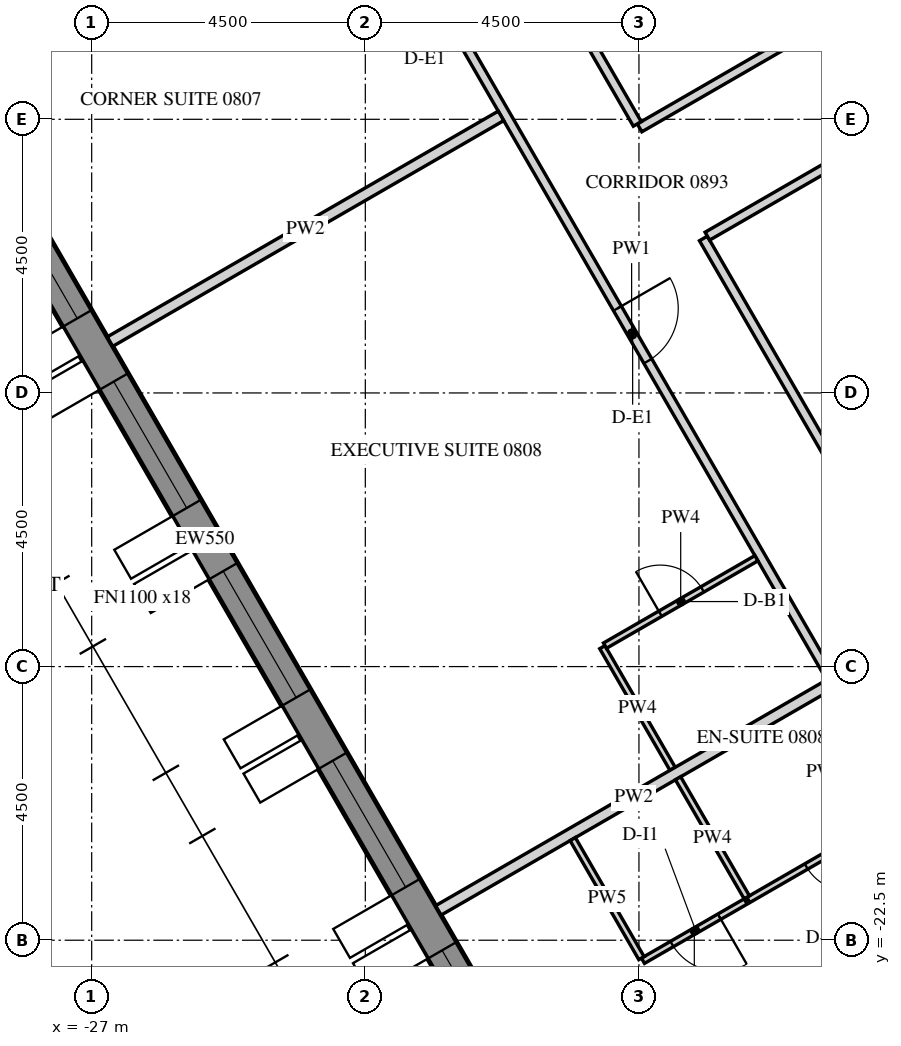
"""IFC4 building model, lengths in metres.
Left out: names, types, materials, properties, quantities, classifications, styles, units other than length and angle.
Written with IfcOpenShell. Run it as: python <this file> out.ifc"""

import sys

from ifc_helpers import new_model, si_unit, direction, frame, frame_2d, origin, place, context, subcontext, project, spatial, polyline, rectangle, outline, extrude, element, fill, save


model = new_model("IFC4")
c1 = context("Model", 3, precision=1e-05, world=origin(), true_north=direction((0.0, 1.0)))
c2 = subcontext(c1, "Body", "Model", "MODEL_VIEW")
j1 = project(units=[si_unit("LENGTHUNIT", "METRE"), si_unit("PLANEANGLEUNIT", "RADIAN")], contexts=[c1])
p1 = place(None, origin())
s1 = spatial("IfcSite", under=j1, at=p1, CompositionType="ELEMENT")
p2 = place(p1, origin())
s2 = spatial("IfcBuilding", under=s1, at=p2, CompositionType="ELEMENT")
p3 = place(p2, frame((0.0, 0.0, 111.6)))
s3 = spatial("IfcBuildingStorey", under=s2, at=p3, CompositionType="ELEMENT", Elevation=111.6)
p4 = place(p3, frame((-32.655, -2.89, -0.15), z_axis=(0.0, 0.0, 1.0), x_axis=(0.499997711317, -0.866026725152, 0.0)))
e1 = element("IfcWall", 1, at=p4, inside=s3, PredefinedType="SOLIDWALL", context=c2, shape_type="SweptSolid", body=[
    extrude(outline(polyline([(-0.022, -0.275), (30.097, -0.275), (30.045, 0.275), (0.022, 0.275), (-0.022, -0.275)])), origin(), (0.0, 0.0, 1.0), 3.9),
])
p5 = place(p4, frame((1.236, 0.0, 1.05)))
e2 = element("IfcOpeningElement", 2, at=p5, cuts=e1, PredefinedType="OPENING", context=c2, shape_type="SweptSolid", body=[
    extrude(rectangle(XDim=2.4, YDim=2.4, at=frame_2d((1.2, 1.2))), frame((0.0, 0.285, 0.0), z_axis=(0.0, -1.0, 0.0), x_axis=(1.0, 0.0, 0.0)), (0.0, 0.0, 1.0), 0.57),
])
p6 = place(p4, frame((4.835, 0.0, 1.05)))
e3 = element("IfcOpeningElement", 3, at=p6, cuts=e1, PredefinedType="OPENING", context=c2, shape_type="SweptSolid", body=[
    extrude(rectangle(XDim=2.4, YDim=2.4, at=frame_2d((1.2, 1.2))), frame((0.0, 0.285, 0.0), z_axis=(0.0, -1.0, 0.0), x_axis=(1.0, 0.0, 0.0)), (0.0, 0.0, 1.0), 0.57),
])
p7 = place(p4, frame((8.436, 0.0, 1.05)))
e4 = element("IfcOpeningElement", 4, at=p7, cuts=e1, PredefinedType="OPENING", context=c2, shape_type="SweptSolid", body=[
    extrude(rectangle(XDim=2.4, YDim=2.4, at=frame_2d((1.2, 1.2))), frame((0.0, 0.285, 0.0), z_axis=(0.0, -1.0, 0.0), x_axis=(1.0, 0.0, 0.0)), (0.0, 0.0, 1.0), 0.57),
])
p8 = place(p4, frame((12.035, 0.0, 1.05)))
e5 = element("IfcOpeningElement", 5, at=p8, cuts=e1, PredefinedType="OPENING", context=c2, shape_type="SweptSolid", body=[
    extrude(rectangle(XDim=2.4, YDim=2.4, at=frame_2d((1.2, 1.2))), frame((0.0, 0.285, 0.0), z_axis=(0.0, -1.0, 0.0), x_axis=(1.0, 0.0, 0.0)), (0.0, 0.0, 1.0), 0.57),
])
p9 = place(p4, frame((15.635, 0.0, 1.05)))
e6 = element("IfcOpeningElement", 6, at=p9, cuts=e1, PredefinedType="OPENING", context=c2, shape_type="SweptSolid", body=[
    extrude(rectangle(XDim=2.4, YDim=2.4, at=frame_2d((1.2, 1.2))), frame((0.0, 0.285, 0.0), z_axis=(0.0, -1.0, 0.0), x_axis=(1.0, 0.0, 0.0)), (0.0, 0.0, 1.0), 0.57),
])
p10 = place(p4, frame((19.236, 0.0, 1.05)))
e7 = element("IfcOpeningElement", 7, at=p10, cuts=e1, PredefinedType="OPENING", context=c2, shape_type="SweptSolid", body=[
    extrude(rectangle(XDim=2.4, YDim=2.4, at=frame_2d((1.2, 1.2))), frame((0.0, 0.285, 0.0), z_axis=(0.0, -1.0, 0.0), x_axis=(1.0, 0.0, 0.0)), (0.0, 0.0, 1.0), 0.57),
])
p11 = place(p4, frame((22.835, 0.0, 1.05)))
e8 = element("IfcOpeningElement", 8, at=p11, cuts=e1, PredefinedType="OPENING", context=c2, shape_type="SweptSolid", body=[
    extrude(rectangle(XDim=2.4, YDim=2.4, at=frame_2d((1.2, 1.2))), frame((0.0, 0.285, 0.0), z_axis=(0.0, -1.0, 0.0), x_axis=(1.0, 0.0, 0.0)), (0.0, 0.0, 1.0), 0.57),
])
p12 = place(p4, frame((26.436, 0.0, 1.05)))
e9 = element("IfcOpeningElement", 9, at=p12, cuts=e1, PredefinedType="OPENING", context=c2, shape_type="SweptSolid", body=[
    extrude(rectangle(XDim=2.4, YDim=2.4, at=frame_2d((1.2, 1.2))), frame((0.0, 0.285, 0.0), z_axis=(0.0, -1.0, 0.0), x_axis=(1.0, 0.0, 0.0)), (0.0, 0.0, 1.0), 0.57),
])
p13 = place(p3, frame((-15.819, 0.0, -0.15), z_axis=(0.0, 0.0, 1.0), x_axis=(0.499999880136, -0.866025472988, 0.0)))
e10 = element("IfcWall", 10, at=p13, inside=s3, PredefinedType="SHEAR", context=c2, shape_type="SweptSolid", body=[
    extrude(outline(polyline([(-0.173, -0.3), (15.993, -0.3), (15.646, 0.3), (0.173, 0.3), (-0.173, -0.3)])), origin(), (0.0, 0.0, 1.0), 3.9),
])
p14 = place(p13, frame((6.981, 0.0, 0.15)))
e11 = element("IfcOpeningElement", 11, at=p14, cuts=e10, PredefinedType="OPENING", context=c2, shape_type="SweptSolid", body=[
    extrude(rectangle(XDim=1.8, YDim=2.4, at=frame_2d((0.9, 1.2))), frame((0.0, 0.31, 0.0), z_axis=(0.0, -1.0, 0.0), x_axis=(1.0, 0.0, 0.0)), (0.0, 0.0, 1.0), 0.62),
])
p15 = place(p3, frame((-24.09, -2.175, 0.0), z_axis=(0.0, 0.0, 1.0), x_axis=(0.499996832073, -0.86602723278, 0.0)))
e12 = element("IfcWall", 12, at=p15, inside=s3, PredefinedType="PARTITIONING", context=c2, shape_type="SweptSolid", body=[
    extrude(rectangle(XDim=23.877, YDim=0.15, at=frame_2d((11.938, 0.0))), origin(), (0.0, 0.0, 1.0), 2.988),
])
p16 = place(p15, frame((4.643, 0.0, 0.0)))
e13 = element("IfcOpeningElement", 13, at=p16, cuts=e12, PredefinedType="OPENING", context=c2, shape_type="SweptSolid", body=[
    extrude(rectangle(XDim=1.0, YDim=2.1, at=frame_2d((0.5, 1.05))), frame((0.0, 0.085, 0.0), z_axis=(0.0, -1.0, 0.0), x_axis=(1.0, 0.0, 0.0)), (0.0, 0.0, 1.0), 0.17),
])
p17 = place(p15, frame((11.472, 0.0, 0.0)))
e14 = element("IfcOpeningElement", 14, at=p17, cuts=e12, PredefinedType="OPENING", context=c2, shape_type="SweptSolid", body=[
    extrude(rectangle(XDim=1.0, YDim=2.1, at=frame_2d((0.5, 1.05))), frame((0.0, 0.085, 0.0), z_axis=(0.0, -1.0, 0.0), x_axis=(1.0, 0.0, 0.0)), (0.0, 0.0, 1.0), 0.17),
])
p18 = place(p15, frame((21.925, 0.0, 0.0)))
e15 = element("IfcOpeningElement", 15, at=p18, cuts=e12, PredefinedType="OPENING", context=c2, shape_type="SweptSolid", body=[
    extrude(rectangle(XDim=1.0, YDim=2.1, at=frame_2d((0.5, 1.05))), frame((0.0, 0.085, 0.0), z_axis=(0.0, -1.0, 0.0), x_axis=(1.0, 0.0, 0.0)), (0.0, 0.0, 1.0), 0.17),
])
p19 = place(p3, frame((-12.664, -6.066, 0.0), z_axis=(0.0, 0.0, 1.0), x_axis=(-0.866023618125, -0.500003092839, 0.0)))
e16 = element("IfcWall", 16, at=p19, inside=s3, PredefinedType="PARTITIONING", context=c2, shape_type="SweptSolid", body=[
    extrude(rectangle(XDim=6.15, YDim=0.15, at=frame_2d((3.075, 0.0))), origin(), (0.0, 0.0, 1.0), 2.988),
])
p20 = place(p3, frame((-18.027, -9.076, 0.0), z_axis=(0.0, 0.0, 1.0), x_axis=(-0.500007318041, 0.86602117867, 0.0)))
e17 = element("IfcWall", 17, at=p20, inside=s3, PredefinedType="PARTITIONING", context=c2, shape_type="SweptSolid", body=[
    extrude(rectangle(XDim=8.383, YDim=0.15, at=frame_2d((4.191, 0.0))), origin(), (0.0, 0.0, 1.0), 2.988),
])
p21 = place(p20, frame((3.742, 0.0, 0.0)))
e18 = element("IfcOpeningElement", 18, at=p21, cuts=e17, PredefinedType="OPENING", context=c2, shape_type="SweptSolid", body=[
    extrude(rectangle(XDim=0.9, YDim=2.1, at=frame_2d((0.45, 1.05))), frame((0.0, 0.085, 0.0), z_axis=(0.0, -1.0, 0.0), x_axis=(1.0, 0.0, 0.0)), (0.0, 0.0, 1.0), 0.17),
])
p22 = place(p3, frame((-11.197, -20.907, 0.0), z_axis=(0.0, 0.0, 1.0), x_axis=(-0.500004557924, 0.86602277225, 0.0)))
e19 = element("IfcWall", 19, at=p22, inside=s3, PredefinedType="PARTITIONING", context=c2, shape_type="SweptSolid", body=[
    extrude(rectangle(XDim=11.487, YDim=0.15, at=frame_2d((5.743, 0.0))), origin(), (0.0, 0.0, 1.0), 2.988),
])
p23 = place(p22, frame((5.293, 0.0, 0.0)))
e20 = element("IfcOpeningElement", 20, at=p23, cuts=e19, PredefinedType="OPENING", context=c2, shape_type="SweptSolid", body=[
    extrude(rectangle(XDim=0.9, YDim=2.1, at=frame_2d((0.45, 1.05))), frame((0.0, 0.085, 0.0), z_axis=(0.0, -1.0, 0.0), x_axis=(1.0, 0.0, 0.0)), (0.0, 0.0, 1.0), 0.17),
])
p24 = place(p3, frame((-16.875, -10.922, 0.0), z_axis=(0.0, 0.0, 1.0), x_axis=(0.866023634079, 0.500003065207, 0.0)))
e21 = element("IfcWall", 21, at=p24, inside=s3, PredefinedType="PARTITIONING", context=c2, shape_type="SweptSolid", body=[
    extrude(rectangle(XDim=6.075, YDim=0.15, at=frame_2d((3.038, 0.0))), origin(), (0.0, 0.0, 1.0), 2.988),
])
p25 = place(p3, frame((-26.699, -12.656, 0.0), z_axis=(0.0, 0.0, 1.0), x_axis=(0.866028983062, 0.499993800457, 0.0)))
e22 = element("IfcWall", 22, at=p25, inside=s3, PredefinedType="PARTITIONING", context=c2, shape_type="SweptSolid", body=[
    extrude(rectangle(XDim=7.425, YDim=0.18, at=frame_2d((3.712, 0.0))), origin(), (0.0, 0.0, 1.0), 2.988),
])
p26 = place(p3, frame((-17.447, -19.681, 0.0), z_axis=(0.0, 0.0, 1.0), x_axis=(-0.500015210774, 0.866016621662, 0.0)))
e23 = element("IfcWall", 23, at=p26, inside=s3, PredefinedType="PARTITIONING", context=c2, shape_type="SweptSolid", body=[
    extrude(rectangle(XDim=2.31, YDim=0.1, at=frame_2d((1.155, 0.0))), origin(), (0.0, 0.0, 1.0), 2.988),
])
p27 = place(p3, frame((-18.559, -17.656, 0.0), z_axis=(0.0, 0.0, 1.0), x_axis=(0.866039941686, 0.499974818771, 0.0)))
e24 = element("IfcWall", 24, at=p27, inside=s3, PredefinedType="PARTITIONING", context=c2, shape_type="SweptSolid", body=[
    extrude(rectangle(XDim=2.875, YDim=0.1, at=frame_2d((1.438, 0.0))), origin(), (0.0, 0.0, 1.0), 2.988),
])
p28 = place(p27, frame((1.05, 0.0, 0.0)))
e25 = element("IfcOpeningElement", 25, at=p28, cuts=e24, PredefinedType="OPENING", context=c2, shape_type="SweptSolid", body=[
    extrude(rectangle(XDim=0.8, YDim=2.1, at=frame_2d((0.4, 1.05))), frame((0.0, 0.06, 0.0), z_axis=(0.0, -1.0, 0.0), x_axis=(1.0, 0.0, 0.0)), (0.0, 0.0, 1.0), 0.12),
])
p29 = place(p3, frame((-21.299, -22.009, 0.0), z_axis=(0.0, 0.0, 1.0), x_axis=(0.866014745021, 0.500018461065, 0.0)))
e26 = element("IfcWall", 26, at=p29, inside=s3, PredefinedType="PARTITIONING", context=c2, shape_type="SweptSolid", body=[
    extrude(rectangle(XDim=7.425, YDim=0.18, at=frame_2d((3.712, 0.0))), origin(), (0.0, 0.0, 1.0), 2.988),
])
p30 = place(p3, frame((-13.669, -20.375, 0.0), z_axis=(0.0, 0.0, 1.0), x_axis=(-0.866046596414, -0.499963291492, 0.0)))
e27 = element("IfcWall", 27, at=p30, inside=s3, PredefinedType="PARTITIONING", context=c2, shape_type="SweptSolid", body=[
    extrude(rectangle(XDim=2.925, YDim=0.1, at=frame_2d((1.462, 0.0))), origin(), (0.0, 0.0, 1.0), 2.988),
])
p31 = place(p30, frame((1.025, 0.0, 0.0)))
e28 = element("IfcOpeningElement", 28, at=p31, cuts=e27, PredefinedType="OPENING", context=c2, shape_type="SweptSolid", body=[
    extrude(rectangle(XDim=0.8, YDim=2.1, at=frame_2d((0.4, 1.05))), frame((0.0, 0.06, 0.0), z_axis=(0.0, -1.0, 0.0), x_axis=(1.0, 0.0, 0.0)), (0.0, 0.0, 1.0), 0.12),
])
p32 = place(p3, frame((-16.245, -21.863, 0.0), z_axis=(0.0, 0.0, 1.0), x_axis=(-0.866000020948, -0.500043961785, 0.0)))
e29 = element("IfcWall", 29, at=p32, inside=s3, PredefinedType="PARTITIONING", context=c2, shape_type="SweptSolid", body=[
    extrude(rectangle(XDim=1.95, YDim=0.1, at=frame_2d((0.975, 0.0))), origin(), (0.0, 0.0, 1.0), 2.988),
])
p33 = place(p32, frame((0.5, 0.0, 0.0)))
e30 = element("IfcOpeningElement", 30, at=p33, cuts=e29, PredefinedType="OPENING", context=c2, shape_type="SweptSolid", body=[
    extrude(rectangle(XDim=0.9, YDim=2.1, at=frame_2d((0.45, 1.05))), frame((0.0, 0.06, 0.0), z_axis=(0.0, -1.0, 0.0), x_axis=(1.0, 0.0, 0.0)), (0.0, 0.0, 1.0), 0.12),
])
p34 = place(p3, frame((-17.959, -22.794, 0.0), z_axis=(0.0, 0.0, 1.0), x_axis=(-0.500031020067, 0.8660074936, 0.0)))
e31 = element("IfcWall", 31, at=p34, inside=s3, PredefinedType="PARTITIONING", context=c2, shape_type="SweptSolid", body=[
    extrude(rectangle(XDim=2.26, YDim=0.1, at=frame_2d((1.13, 0.0))), origin(), (0.0, 0.0, 1.0), 2.988),
])
p35 = place(p3, frame((-15.983, -30.059, 0.0), z_axis=(0.0, 0.0, 1.0), x_axis=(0.469476547643, 0.882944942346, 0.0)))
e32 = element("IfcWall", 32, at=p35, inside=s3, PredefinedType="PARTITIONING", context=c2, shape_type="SweptSolid", body=[
    extrude(rectangle(XDim=8.073, YDim=0.1, at=frame_2d((4.037, 0.0))), origin(), (0.0, 0.0, 1.0), 2.988),
])
p36 = place(p35, frame((3.631, 0.0, 0.0)))
e33 = element("IfcOpeningElement", 33, at=p36, cuts=e32, PredefinedType="OPENING", context=c2, shape_type="SweptSolid", body=[
    extrude(rectangle(XDim=0.9, YDim=2.1, at=frame_2d((0.45, 1.05))), frame((0.0, 0.06, 0.0), z_axis=(0.0, -1.0, 0.0), x_axis=(1.0, 0.0, 0.0)), (0.0, 0.0, 1.0), 0.12),
])
p37 = place(p3, frame((-17.357, -19.837, 0.0), z_axis=(0.0, 0.0, 1.0), x_axis=(0.49995000081, -0.866054268906, 0.0)))
e34 = element("IfcWall", 34, at=p37, inside=s3, PredefinedType="PARTITIONING", context=c2, shape_type="SweptSolid", body=[
    extrude(rectangle(XDim=2.26, YDim=0.1, at=frame_2d((1.13, 0.0))), origin(), (0.0, 0.0, 1.0), 2.988),
])
p38 = place(p7, frame((0.0, 0.205, 0.0)))
e35 = element("IfcWindow", 35, at=p38, inside=s3, PartitioningType="DOUBLE_PANEL_VERTICAL", PredefinedType="WINDOW", context=c2, shape_type="SweptSolid", body=[
    extrude(rectangle(XDim=2.4, YDim=2.4, at=frame_2d((1.2, 1.2))), frame((0.0, 0.03, 0.0), z_axis=(0.0, -1.0, 0.0), x_axis=(1.0, 0.0, 0.0)), (0.0, 0.0, 1.0), 0.06),
])
fill(e4, e35)
p39 = place(p8, frame((0.0, 0.205, 0.0)))
e36 = element("IfcWindow", 36, at=p39, inside=s3, PartitioningType="DOUBLE_PANEL_VERTICAL", PredefinedType="WINDOW", context=c2, shape_type="SweptSolid", body=[
    extrude(rectangle(XDim=2.4, YDim=2.4, at=frame_2d((1.2, 1.2))), frame((0.0, 0.03, 0.0), z_axis=(0.0, -1.0, 0.0), x_axis=(1.0, 0.0, 0.0)), (0.0, 0.0, 1.0), 0.06),
])
fill(e5, e36)
p40 = place(p9, frame((0.0, 0.205, 0.0)))
e37 = element("IfcWindow", 37, at=p40, inside=s3, PartitioningType="DOUBLE_PANEL_VERTICAL", PredefinedType="WINDOW", context=c2, shape_type="SweptSolid", body=[
    extrude(rectangle(XDim=2.4, YDim=2.4, at=frame_2d((1.2, 1.2))), frame((0.0, 0.03, 0.0), z_axis=(0.0, -1.0, 0.0), x_axis=(1.0, 0.0, 0.0)), (0.0, 0.0, 1.0), 0.06),
])
fill(e6, e37)
p41 = place(p10, frame((0.0, 0.205, 0.0)))
e38 = element("IfcWindow", 38, at=p41, inside=s3, PartitioningType="DOUBLE_PANEL_VERTICAL", PredefinedType="WINDOW", context=c2, shape_type="SweptSolid", body=[
    extrude(rectangle(XDim=2.4, YDim=2.4, at=frame_2d((1.2, 1.2))), frame((0.0, 0.03, 0.0), z_axis=(0.0, -1.0, 0.0), x_axis=(1.0, 0.0, 0.0)), (0.0, 0.0, 1.0), 0.06),
])
fill(e7, e38)
p42 = place(p11, frame((0.0, 0.205, 0.0)))
e39 = element("IfcWindow", 39, at=p42, inside=s3, PartitioningType="DOUBLE_PANEL_VERTICAL", PredefinedType="WINDOW", context=c2, shape_type="SweptSolid", body=[
    extrude(rectangle(XDim=2.4, YDim=2.4, at=frame_2d((1.2, 1.2))), frame((0.0, 0.03, 0.0), z_axis=(0.0, -1.0, 0.0), x_axis=(1.0, 0.0, 0.0)), (0.0, 0.0, 1.0), 0.06),
])
fill(e8, e39)
p43 = place(p17, origin())
e40 = element("IfcDoor", 40, at=p43, inside=s3, OperationType="SINGLE_SWING_RIGHT", PredefinedType="DOOR", context=c2, shape_type="SweptSolid", body=[
    extrude(rectangle(XDim=1.0, YDim=2.1, at=frame_2d((0.5, 1.05))), frame((0.0, 0.025, 0.0), z_axis=(0.0, -1.0, 0.0), x_axis=(1.0, 0.0, 0.0)), (0.0, 0.0, 1.0), 0.05),
])
fill(e14, e40)
p44 = place(p28, origin())
e41 = element("IfcDoor", 41, at=p44, inside=s3, OperationType="SINGLE_SWING_LEFT", PredefinedType="DOOR", context=c2, shape_type="SweptSolid", body=[
    extrude(rectangle(XDim=0.8, YDim=2.1, at=frame_2d((0.4, 1.05))), frame((0.0, 0.025, 0.0), z_axis=(0.0, -1.0, 0.0), x_axis=(1.0, 0.0, 0.0)), (0.0, 0.0, 1.0), 0.05),
])
fill(e25, e41)
p45 = place(p31, origin())
e42 = element("IfcDoor", 42, at=p45, inside=s3, OperationType="SINGLE_SWING_RIGHT", PredefinedType="DOOR", context=c2, shape_type="SweptSolid", body=[
    extrude(rectangle(XDim=0.8, YDim=2.1, at=frame_2d((0.4, 1.05))), frame((0.0, 0.025, 0.0), z_axis=(0.0, -1.0, 0.0), x_axis=(1.0, 0.0, 0.0)), (0.0, 0.0, 1.0), 0.05),
])
fill(e28, e42)
p46 = place(p33, origin())
e43 = element("IfcDoor", 43, at=p46, inside=s3, OperationType="SINGLE_SWING_RIGHT", PredefinedType="DOOR", context=c2, shape_type="SweptSolid", body=[
    extrude(rectangle(XDim=0.9, YDim=2.1, at=frame_2d((0.45, 1.05))), frame((0.0, 0.025, 0.0), z_axis=(0.0, -1.0, 0.0), x_axis=(1.0, 0.0, 0.0)), (0.0, 0.0, 1.0), 0.05),
])
fill(e30, e43)
save(model, sys.argv[1])
